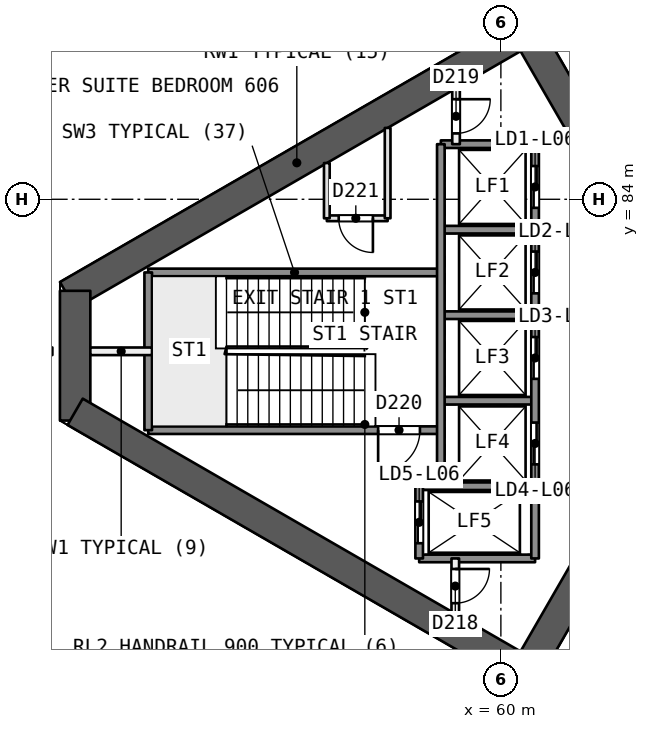
"""IFC4 building model, lengths in metres.
Left out: names, types, materials, properties, quantities, classifications, styles, units other than length and angle.
Written with IfcOpenShell. Run it as: python <this file> out.ifc"""

import sys

from ifc_helpers import new_model, si_unit, direction, frame, frame_2d, origin, place, context, subcontext, project, spatial, rectangle, extrude, element, fill, save


model = new_model("IFC4")
c1 = context("Model", 3, precision=1e-05, world=origin(), true_north=direction((0.0, 1.0)))
c2 = subcontext(c1, "Body", "Model", "MODEL_VIEW")
j1 = project(units=[si_unit("LENGTHUNIT", "METRE"), si_unit("PLANEANGLEUNIT", "RADIAN")], contexts=[c1])
p1 = place(None, origin())
s1 = spatial("IfcSite", under=j1, at=p1, CompositionType="ELEMENT")
p2 = place(p1, origin())
s2 = spatial("IfcBuilding", under=s1, at=p2, CompositionType="ELEMENT")
p3 = place(p2, frame((0.0, 0.0, 33.7)))
s3 = spatial("IfcBuildingStorey", under=s2, at=p3, CompositionType="ELEMENT", Elevation=33.7)
p4 = place(p3, frame((65.538, 80.0, 0.0), z_axis=(0.0, 0.0, 1.0), x_axis=(-0.49999662545, 0.866027352073, 0.0)))
e1 = element("IfcWall", 1, at=p4, inside=s3, PredefinedType="SHEAR", context=c2, shape_type="SweptSolid", body=[
    extrude(rectangle(XDim=10.149, YDim=0.8, at=frame_2d((5.074, 0.0))), origin(), (0.0, 0.0, 1.0), 3.7),
])
p5 = place(p4, frame((0.719, 0.0, 0.0)))
e2 = element("IfcOpeningElement", 2, at=p5, cuts=e1, PredefinedType="OPENING", context=c2, shape_type="SweptSolid", body=[
    extrude(rectangle(XDim=1.2, YDim=2.1, at=frame_2d((0.6, 1.05))), frame((0.0, 0.411, 0.0), z_axis=(0.0, -1.0, 0.0), x_axis=(1.0, 0.0, 0.0)), (0.0, 0.0, 1.0), 0.821),
])
p6 = place(p3, frame((60.664, 88.443, 0.0), z_axis=(0.0, 0.0, 1.0), x_axis=(-0.866029478545, -0.499992942241, 0.0)))
e3 = element("IfcWall", 3, at=p6, inside=s3, PredefinedType="SHEAR", context=c2, shape_type="SweptSolid", body=[
    extrude(rectangle(XDim=13.933, YDim=0.8, at=frame_2d((6.967, 0.0))), origin(), (0.0, 0.0, 1.0), 3.7),
])
p7 = place(p3, frame((48.797, 81.592, 0.0), z_axis=(0.0, 0.0, 1.0), x_axis=(0.0, -1.0, 0.0)))
e4 = element("IfcWall", 4, at=p7, inside=s3, PredefinedType="SHEAR", context=c2, shape_type="SweptSolid", body=[
    extrude(rectangle(XDim=3.415, YDim=0.8, at=frame_2d((1.707, 0.0))), origin(), (0.0, 0.0, 1.0), 3.7),
])
p8 = place(p3, frame((48.797, 78.408, 0.0), z_axis=(0.0, 0.0, 1.0), x_axis=(0.866032504327, -0.499987701298, 0.0)))
e5 = element("IfcWall", 5, at=p8, inside=s3, PredefinedType="SHEAR", context=c2, shape_type="SweptSolid", body=[
    extrude(rectangle(XDim=14.102, YDim=0.8, at=frame_2d((7.051, 0.0))), origin(), (0.0, 0.0, 1.0), 3.7),
])
p9 = place(p3, frame((60.664, 71.557, 0.0), z_axis=(0.0, 0.0, 1.0), x_axis=(0.50000409368, 0.866023040284, 0.0)))
e6 = element("IfcWall", 6, at=p9, inside=s3, PredefinedType="SHEAR", context=c2, shape_type="SweptSolid", body=[
    extrude(rectangle(XDim=9.98, YDim=0.8, at=frame_2d((4.99, 0.0))), origin(), (0.0, 0.0, 1.0), 3.7),
])
p10 = place(p9, frame((7.83, 0.0, 0.0)))
e7 = element("IfcOpeningElement", 7, at=p10, cuts=e6, PredefinedType="OPENING", context=c2, shape_type="SweptSolid", body=[
    extrude(rectangle(XDim=1.2, YDim=2.1, at=frame_2d((0.6, 1.05))), frame((0.0, 0.411, 0.0), z_axis=(0.0, -1.0, 0.0), x_axis=(1.0, 0.0, 0.0)), (0.0, 0.0, 1.0), 0.821),
])
p11 = place(p3, frame((37.759, 80.001, 0.0), z_axis=(0.0, 0.0, 1.0), x_axis=(1.0, 0.0, 0.0)))
e8 = element("IfcWall", 8, at=p11, inside=s3, PredefinedType="PARTITIONING", context=c2, shape_type="SweptSolid", body=[
    extrude(rectangle(XDim=10.439, YDim=0.2, at=frame_2d((5.22, 0.0))), origin(), (0.0, 0.0, 1.0), 3.2),
])
p12 = place(p3, frame((61.662, 63.133, 0.0), z_axis=(0.0, 0.0, 1.0), x_axis=(0.499999157533, 0.866025890183, 0.0)))
e9 = element("IfcWall", 9, at=p12, inside=s3, PredefinedType="PARTITIONING", context=c2, shape_type="SweptSolid", body=[
    extrude(rectangle(XDim=11.176, YDim=0.2, at=frame_2d((5.588, 0.0))), origin(), (0.0, 0.0, 1.0), 3.2),
])
p13 = place(p3, frame((37.61, 83.152, 0.0), z_axis=(0.0, 0.0, 1.0), x_axis=(0.866024438126, 0.500001672566, 0.0)))
e10 = element("IfcWall", 10, at=p13, inside=s3, PredefinedType="SOLIDWALL", context=c2, shape_type="SweptSolid", body=[
    extrude(rectangle(XDim=61.61, YDim=0.3, at=frame_2d((30.805, 0.0))), origin(), (0.0, 0.0, 1.0), 3.2),
])
p14 = place(p13, frame((34.281, 0.0, 0.0)))
e11 = element("IfcOpeningElement", 11, at=p14, cuts=e10, PredefinedType="OPENING", context=c2, shape_type="SweptSolid", body=[
    extrude(rectangle(XDim=2.4, YDim=2.4, at=frame_2d((1.2, 1.2))), frame((0.0, 0.161, 0.0), z_axis=(0.0, -1.0, 0.0), x_axis=(1.0, 0.0, 0.0)), (0.0, 0.0, 1.0), 0.321),
])
p15 = place(p13, frame((47.767, 0.0, 0.0)))
e12 = element("IfcOpeningElement", 12, at=p15, cuts=e10, PredefinedType="OPENING", context=c2, shape_type="SweptSolid", body=[
    extrude(rectangle(XDim=2.4, YDim=2.4, at=frame_2d((1.2, 1.2))), frame((0.0, 0.161, 0.0), z_axis=(0.0, -1.0, 0.0), x_axis=(1.0, 0.0, 0.0)), (0.0, 0.0, 1.0), 0.321),
])
p16 = place(p13, frame((24.305, 0.0, 0.0)))
e13 = element("IfcOpeningElement", 13, at=p16, cuts=e10, PredefinedType="OPENING", context=c2, shape_type="SweptSolid", body=[
    extrude(rectangle(XDim=2.4, YDim=2.4, at=frame_2d((1.2, 1.2))), frame((0.0, 0.161, 0.0), z_axis=(0.0, -1.0, 0.0), x_axis=(1.0, 0.0, 0.0)), (0.0, 0.0, 1.0), 0.321),
])
p17 = place(p13, frame((11.402, 0.0, 0.0)))
e14 = element("IfcOpeningElement", 14, at=p17, cuts=e10, PredefinedType="OPENING", context=c2, shape_type="SweptSolid", body=[
    extrude(rectangle(XDim=2.4, YDim=2.4, at=frame_2d((1.2, 1.2))), frame((0.0, 0.161, 0.0), z_axis=(0.0, -1.0, 0.0), x_axis=(1.0, 0.0, 0.0)), (0.0, 0.0, 1.0), 0.321),
])
p18 = place(p13, frame((28.981, 0.0, 0.0)))
e15 = element("IfcOpeningElement", 15, at=p18, cuts=e10, PredefinedType="OPENING", context=c2, shape_type="SweptSolid", body=[
    extrude(rectangle(XDim=2.4, YDim=2.4, at=frame_2d((1.2, 1.2))), frame((0.0, 0.161, 0.0), z_axis=(0.0, -1.0, 0.0), x_axis=(1.0, 0.0, 0.0)), (0.0, 0.0, 1.0), 0.321),
])
p19 = place(p3, frame((90.965, 46.043, 0.0), z_axis=(0.0, 0.0, 1.0), x_axis=(-0.866024438126, 0.500001672566, 0.0)))
e16 = element("IfcWall", 16, at=p19, inside=s3, PredefinedType="SOLIDWALL", context=c2, shape_type="SweptSolid", body=[
    extrude(rectangle(XDim=61.61, YDim=0.3, at=frame_2d((30.805, 0.0))), origin(), (0.0, 0.0, 1.0), 3.2),
])
p20 = place(p19, frame((29.293, 0.0, 0.0)))
e17 = element("IfcOpeningElement", 17, at=p20, cuts=e16, PredefinedType="OPENING", context=c2, shape_type="SweptSolid", body=[
    extrude(rectangle(XDim=2.4, YDim=2.4, at=frame_2d((1.2, 1.2))), frame((0.0, 0.161, 0.0), z_axis=(0.0, -1.0, 0.0), x_axis=(1.0, 0.0, 0.0)), (0.0, 0.0, 1.0), 0.321),
])
p21 = place(p19, frame((46.61, 0.0, 0.0)))
e18 = element("IfcOpeningElement", 18, at=p21, cuts=e16, PredefinedType="OPENING", context=c2, shape_type="SweptSolid", body=[
    extrude(rectangle(XDim=2.4, YDim=2.4, at=frame_2d((1.2, 1.2))), frame((0.0, 0.161, 0.0), z_axis=(0.0, -1.0, 0.0), x_axis=(1.0, 0.0, 0.0)), (0.0, 0.0, 1.0), 0.321),
])
p22 = place(p19, frame((12.289, 0.0, 0.0)))
e19 = element("IfcOpeningElement", 19, at=p22, cuts=e16, PredefinedType="OPENING", context=c2, shape_type="SweptSolid", body=[
    extrude(rectangle(XDim=2.4, YDim=2.4, at=frame_2d((1.2, 1.2))), frame((0.0, 0.161, 0.0), z_axis=(0.0, -1.0, 0.0), x_axis=(1.0, 0.0, 0.0)), (0.0, 0.0, 1.0), 0.321),
])
p23 = place(p3, frame((60.9, 85.45, 0.0), z_axis=(0.0, 0.0, 1.0), x_axis=(-1.0, 0.0, 0.0)))
e20 = element("IfcWall", 20, at=p23, inside=s3, PredefinedType="SOLIDWALL", context=c2, shape_type="SweptSolid", body=[
    extrude(rectangle(XDim=2.48, YDim=0.2, at=frame_2d((1.24, 0.0))), origin(), (0.0, 0.0, 1.0), 3.2),
])
p24 = place(p3, frame((57.02, 83.5, 0.0), z_axis=(0.0, 0.0, 1.0), x_axis=(-1.0, 0.0, 0.0)))
e21 = element("IfcWall", 21, at=p24, inside=s3, PredefinedType="PARTITIONING", context=c2, shape_type="SweptSolid", body=[
    extrude(rectangle(XDim=1.6, YDim=0.15, at=frame_2d((0.8, 0.0))), origin(), (0.0, 0.0, 1.0), 3.2),
])
p25 = place(p24, frame((0.387, 0.0, 0.0)))
e22 = element("IfcOpeningElement", 22, at=p25, cuts=e21, PredefinedType="OPENING", context=c2, shape_type="SweptSolid", body=[
    extrude(rectangle(XDim=0.9, YDim=2.1, at=frame_2d((0.45, 1.05))), frame((0.0, 0.085, 0.0), z_axis=(0.0, -1.0, 0.0), x_axis=(1.0, 0.0, 0.0)), (0.0, 0.0, 1.0), 0.171),
])
p26 = place(p3, frame((60.9, 83.2, 0.0), z_axis=(0.0, 0.0, 1.0), x_axis=(-1.0, 0.0, 0.0)))
e23 = element("IfcWall", 23, at=p26, inside=s3, PredefinedType="SOLIDWALL", context=c2, shape_type="SweptSolid", body=[
    extrude(rectangle(XDim=2.48, YDim=0.2, at=frame_2d((1.24, 0.0))), origin(), (0.0, 0.0, 1.0), 3.2),
])
p27 = place(p3, frame((58.42, 82.075, 0.0), z_axis=(0.0, 0.0, 1.0), x_axis=(-1.0, 0.0, 0.0)))
e24 = element("IfcWall", 24, at=p27, inside=s3, PredefinedType="SOLIDWALL", context=c2, shape_type="SweptSolid", body=[
    extrude(rectangle(XDim=7.7, YDim=0.2, at=frame_2d((3.85, 0.0))), origin(), (0.0, 0.0, 1.0), 3.2),
])
p28 = place(p3, frame((60.9, 80.95, 0.0), z_axis=(0.0, 0.0, 1.0), x_axis=(-1.0, 0.0, 0.0)))
e25 = element("IfcWall", 25, at=p28, inside=s3, PredefinedType="SOLIDWALL", context=c2, shape_type="SweptSolid", body=[
    extrude(rectangle(XDim=2.48, YDim=0.2, at=frame_2d((1.24, 0.0))), origin(), (0.0, 0.0, 1.0), 3.2),
])
p29 = place(p3, frame((50.82, 80.0, 0.0), z_axis=(0.0, 0.0, 1.0), x_axis=(-1.0, 0.0, 0.0)))
e26 = element("IfcWall", 26, at=p29, inside=s3, PredefinedType="PARTITIONING", context=c2, shape_type="SweptSolid", body=[
    extrude(rectangle(XDim=1.623, YDim=0.2, at=frame_2d((0.812, 0.0))), origin(), (0.0, 0.0, 1.0), 3.2),
])
p30 = place(p3, frame((60.9, 78.7, 0.0), z_axis=(0.0, 0.0, 1.0), x_axis=(-1.0, 0.0, 0.0)))
e27 = element("IfcWall", 27, at=p30, inside=s3, PredefinedType="SOLIDWALL", context=c2, shape_type="SweptSolid", body=[
    extrude(rectangle(XDim=2.48, YDim=0.2, at=frame_2d((1.24, 0.0))), origin(), (0.0, 0.0, 1.0), 3.2),
])
p31 = place(p3, frame((58.42, 77.925, 0.0), z_axis=(0.0, 0.0, 1.0), x_axis=(-1.0, 0.0, 0.0)))
e28 = element("IfcWall", 28, at=p31, inside=s3, PredefinedType="SOLIDWALL", context=c2, shape_type="SweptSolid", body=[
    extrude(rectangle(XDim=7.7, YDim=0.2, at=frame_2d((3.85, 0.0))), origin(), (0.0, 0.0, 1.0), 3.2),
])
p32 = place(p31, frame((0.55, 0.0, 0.0)))
e29 = element("IfcOpeningElement", 29, at=p32, cuts=e28, PredefinedType="OPENING", context=c2, shape_type="SweptSolid", body=[
    extrude(rectangle(XDim=1.1, YDim=2.1, at=frame_2d((0.55, 1.05))), frame((0.0, 0.11, 0.0), z_axis=(0.0, -1.0, 0.0), x_axis=(1.0, 0.0, 0.0)), (0.0, 0.0, 1.0), 0.221),
])
for number, where, z_axis, x_axis in (
    (30, (60.9, 76.45, 0.0), (0.0, 0.0, 1.0), (-1.0, 0.0, 0.0)),
    (31, (60.9, 74.55, 0.0), (0.0, 0.0, 1.0), (-1.0, 0.0, 0.0)),
):
    element("IfcWall", number, at=place(p3, frame(where, z_axis=z_axis, x_axis=x_axis)), inside=s3, PredefinedType="SOLIDWALL", context=c2, shape_type="SweptSolid", body=[
        extrude(rectangle(XDim=3.05, YDim=0.2, at=frame_2d((1.525, 0.0))), origin(), (0.0, 0.0, 1.0), 3.2),
    ])
p33 = place(p3, frame((60.9, 85.45, 0.0), z_axis=(0.0, 0.0, 1.0), x_axis=(0.0, -1.0, 0.0)))
e32 = element("IfcWall", 32, at=p33, inside=s3, PredefinedType="SOLIDWALL", context=c2, shape_type="SweptSolid", body=[
    extrude(rectangle(XDim=10.9, YDim=0.2, at=frame_2d((5.45, 0.0))), origin(), (0.0, 0.0, 1.0), 3.2),
])
p34 = place(p33, frame((0.575, 0.0, 0.0)))
e33 = element("IfcOpeningElement", 33, at=p34, cuts=e32, PredefinedType="OPENING", context=c2, shape_type="SweptSolid", body=[
    extrude(rectangle(XDim=1.1, YDim=2.1, at=frame_2d((0.55, 1.05))), frame((0.0, 0.11, 0.0), z_axis=(0.0, -1.0, 0.0), x_axis=(1.0, 0.0, 0.0)), (0.0, 0.0, 1.0), 0.221),
])
p35 = place(p33, frame((2.825, 0.0, 0.0)))
e34 = element("IfcOpeningElement", 34, at=p35, cuts=e32, PredefinedType="OPENING", context=c2, shape_type="SweptSolid", body=[
    extrude(rectangle(XDim=1.1, YDim=2.1, at=frame_2d((0.55, 1.05))), frame((0.0, 0.11, 0.0), z_axis=(0.0, -1.0, 0.0), x_axis=(1.0, 0.0, 0.0)), (0.0, 0.0, 1.0), 0.221),
])
p36 = place(p33, frame((5.075, 0.0, 0.0)))
e35 = element("IfcOpeningElement", 35, at=p36, cuts=e32, PredefinedType="OPENING", context=c2, shape_type="SweptSolid", body=[
    extrude(rectangle(XDim=1.1, YDim=2.1, at=frame_2d((0.55, 1.05))), frame((0.0, 0.11, 0.0), z_axis=(0.0, -1.0, 0.0), x_axis=(1.0, 0.0, 0.0)), (0.0, 0.0, 1.0), 0.221),
])
p37 = place(p33, frame((7.325, 0.0, 0.0)))
e36 = element("IfcOpeningElement", 36, at=p37, cuts=e32, PredefinedType="OPENING", context=c2, shape_type="SweptSolid", body=[
    extrude(rectangle(XDim=1.1, YDim=2.1, at=frame_2d((0.55, 1.05))), frame((0.0, 0.11, 0.0), z_axis=(0.0, -1.0, 0.0), x_axis=(1.0, 0.0, 0.0)), (0.0, 0.0, 1.0), 0.221),
])
p38 = place(p3, frame((58.82, 86.917, 0.0), z_axis=(0.0, 0.0, 1.0), x_axis=(0.0, -1.0, 0.0)))
e37 = element("IfcWall", 37, at=p38, inside=s3, PredefinedType="PARTITIONING", context=c2, shape_type="SweptSolid", body=[
    extrude(rectangle(XDim=1.467, YDim=0.2, at=frame_2d((0.733, 0.0))), origin(), (0.0, 0.0, 1.0), 3.2),
])
p39 = place(p38, frame((0.283, 0.0, 0.0)))
e38 = element("IfcOpeningElement", 38, at=p39, cuts=e37, PredefinedType="OPENING", context=c2, shape_type="SweptSolid", body=[
    extrude(rectangle(XDim=0.9, YDim=2.1, at=frame_2d((0.45, 1.05))), frame((0.0, 0.11, 0.0), z_axis=(0.0, -1.0, 0.0), x_axis=(1.0, 0.0, 0.0)), (0.0, 0.0, 1.0), 0.221),
])
p40 = place(p3, frame((58.8, 74.55, 0.0), z_axis=(0.0, 0.0, 1.0), x_axis=(0.0, -1.0, 0.0)))
e39 = element("IfcWall", 39, at=p40, inside=s3, PredefinedType="PARTITIONING", context=c2, shape_type="SweptSolid", body=[
    extrude(rectangle(XDim=1.455, YDim=0.2, at=frame_2d((0.728, 0.0))), origin(), (0.0, 0.0, 1.0), 3.2),
])
p41 = place(p40, frame((0.278, 0.0, 0.0)))
e40 = element("IfcOpeningElement", 40, at=p41, cuts=e39, PredefinedType="OPENING", context=c2, shape_type="SweptSolid", body=[
    extrude(rectangle(XDim=0.9, YDim=2.1, at=frame_2d((0.45, 1.05))), frame((0.0, 0.11, 0.0), z_axis=(0.0, -1.0, 0.0), x_axis=(1.0, 0.0, 0.0)), (0.0, 0.0, 1.0), 0.221),
])
p42 = place(p3, frame((58.42, 85.45, 0.0), z_axis=(0.0, 0.0, 1.0), x_axis=(0.0, -1.0, 0.0)))
e41 = element("IfcWall", 41, at=p42, inside=s3, PredefinedType="SOLIDWALL", context=c2, shape_type="SweptSolid", body=[
    extrude(rectangle(XDim=9.0, YDim=0.2, at=frame_2d((4.5, 0.0))), origin(), (0.0, 0.0, 1.0), 3.2),
])
p43 = place(p3, frame((57.85, 76.45, 0.0), z_axis=(0.0, 0.0, 1.0), x_axis=(0.0, -1.0, 0.0)))
e42 = element("IfcWall", 42, at=p43, inside=s3, PredefinedType="SOLIDWALL", context=c2, shape_type="SweptSolid", body=[
    extrude(rectangle(XDim=1.9, YDim=0.2, at=frame_2d((0.95, 0.0))), origin(), (0.0, 0.0, 1.0), 3.2),
])
p44 = place(p43, frame((0.4, 0.0, 0.0)))
e43 = element("IfcOpeningElement", 43, at=p44, cuts=e42, PredefinedType="OPENING", context=c2, shape_type="SweptSolid", body=[
    extrude(rectangle(XDim=1.1, YDim=2.1, at=frame_2d((0.55, 1.05))), frame((0.0, 0.11, 0.0), z_axis=(0.0, -1.0, 0.0), x_axis=(1.0, 0.0, 0.0)), (0.0, 0.0, 1.0), 0.221),
])
p45 = place(p3, frame((57.02, 85.877, 0.0), z_axis=(0.0, 0.0, 1.0), x_axis=(0.0, -1.0, 0.0)))
e44 = element("IfcWall", 44, at=p45, inside=s3, PredefinedType="PARTITIONING", context=c2, shape_type="SweptSolid", body=[
    extrude(rectangle(XDim=2.377, YDim=0.15, at=frame_2d((1.189, 0.0))), origin(), (0.0, 0.0, 1.0), 3.2),
])
p46 = place(p3, frame((55.42, 84.954, 0.0), z_axis=(0.0, 0.0, 1.0), x_axis=(0.0, -1.0, 0.0)))
e45 = element("IfcWall", 45, at=p46, inside=s3, PredefinedType="PARTITIONING", context=c2, shape_type="SweptSolid", body=[
    extrude(rectangle(XDim=1.454, YDim=0.15, at=frame_2d((0.727, 0.0))), origin(), (0.0, 0.0, 1.0), 3.2),
])
p47 = place(p3, frame((50.72, 82.075, 0.0), z_axis=(0.0, 0.0, 1.0), x_axis=(0.0, -1.0, 0.0)))
e46 = element("IfcWall", 46, at=p47, inside=s3, PredefinedType="SOLIDWALL", context=c2, shape_type="SweptSolid", body=[
    extrude(rectangle(XDim=4.15, YDim=0.2, at=frame_2d((2.075, 0.0))), origin(), (0.0, 0.0, 1.0), 3.2),
])
p48 = place(p34, origin())
e47 = element("IfcDoor", 47, at=p48, inside=s3, OperationType="SLIDING_TO_RIGHT", PredefinedType="NOTDEFINED", context=c2, shape_type="SweptSolid", body=[
    extrude(rectangle(XDim=1.1, YDim=2.1, at=frame_2d((0.55, 1.05))), frame((0.0, 0.025, 0.0), z_axis=(0.0, -1.0, 0.0), x_axis=(1.0, 0.0, 0.0)), (0.0, 0.0, 1.0), 0.05),
])
fill(e33, e47)
p49 = place(p35, origin())
e48 = element("IfcDoor", 48, at=p49, inside=s3, OperationType="SLIDING_TO_LEFT", PredefinedType="NOTDEFINED", context=c2, shape_type="SweptSolid", body=[
    extrude(rectangle(XDim=1.1, YDim=2.1, at=frame_2d((0.55, 1.05))), frame((0.0, 0.025, 0.0), z_axis=(0.0, -1.0, 0.0), x_axis=(1.0, 0.0, 0.0)), (0.0, 0.0, 1.0), 0.05),
])
fill(e34, e48)
p50 = place(p36, origin())
e49 = element("IfcDoor", 49, at=p50, inside=s3, OperationType="SLIDING_TO_RIGHT", PredefinedType="NOTDEFINED", context=c2, shape_type="SweptSolid", body=[
    extrude(rectangle(XDim=1.1, YDim=2.1, at=frame_2d((0.55, 1.05))), frame((0.0, 0.025, 0.0), z_axis=(0.0, -1.0, 0.0), x_axis=(1.0, 0.0, 0.0)), (0.0, 0.0, 1.0), 0.05),
])
fill(e35, e49)
p51 = place(p37, origin())
e50 = element("IfcDoor", 50, at=p51, inside=s3, OperationType="SLIDING_TO_LEFT", PredefinedType="NOTDEFINED", context=c2, shape_type="SweptSolid", body=[
    extrude(rectangle(XDim=1.1, YDim=2.1, at=frame_2d((0.55, 1.05))), frame((0.0, 0.025, 0.0), z_axis=(0.0, -1.0, 0.0), x_axis=(1.0, 0.0, 0.0)), (0.0, 0.0, 1.0), 0.05),
])
fill(e36, e50)
p52 = place(p44, origin())
e51 = element("IfcDoor", 51, at=p52, inside=s3, OperationType="SLIDING_TO_RIGHT", PredefinedType="NOTDEFINED", context=c2, shape_type="SweptSolid", body=[
    extrude(rectangle(XDim=1.1, YDim=2.1, at=frame_2d((0.55, 1.05))), frame((0.0, 0.025, 0.0), z_axis=(0.0, -1.0, 0.0), x_axis=(1.0, 0.0, 0.0)), (0.0, 0.0, 1.0), 0.05),
])
fill(e43, e51)
p53 = place(p41, origin())
e52 = element("IfcDoor", 52, at=p53, inside=s3, OperationType="SINGLE_SWING_LEFT", PredefinedType="NOTDEFINED", context=c2, shape_type="SweptSolid", body=[
    extrude(rectangle(XDim=0.9, YDim=2.1, at=frame_2d((0.45, 1.05))), frame((0.0, 0.025, 0.0), z_axis=(0.0, -1.0, 0.0), x_axis=(1.0, 0.0, 0.0)), (0.0, 0.0, 1.0), 0.05),
])
fill(e40, e52)
p54 = place(p39, origin())
e53 = element("IfcDoor", 53, at=p54, inside=s3, OperationType="SINGLE_SWING_LEFT", PredefinedType="NOTDEFINED", context=c2, shape_type="SweptSolid", body=[
    extrude(rectangle(XDim=0.9, YDim=2.1, at=frame_2d((0.45, 1.05))), frame((0.0, 0.025, 0.0), z_axis=(0.0, -1.0, 0.0), x_axis=(1.0, 0.0, 0.0)), (0.0, 0.0, 1.0), 0.05),
])
fill(e38, e53)
p55 = place(p32, origin())
e54 = element("IfcDoor", 54, at=p55, inside=s3, OperationType="SINGLE_SWING_RIGHT", PredefinedType="NOTDEFINED", context=c2, shape_type="SweptSolid", body=[
    extrude(rectangle(XDim=1.1, YDim=2.1, at=frame_2d((0.55, 1.05))), frame((0.0, 0.025, 0.0), z_axis=(0.0, -1.0, 0.0), x_axis=(1.0, 0.0, 0.0)), (0.0, 0.0, 1.0), 0.05),
])
fill(e29, e54)
p56 = place(p25, origin())
e55 = element("IfcDoor", 55, at=p56, inside=s3, OperationType="SINGLE_SWING_LEFT", PredefinedType="NOTDEFINED", context=c2, shape_type="SweptSolid", body=[
    extrude(rectangle(XDim=0.9, YDim=2.1, at=frame_2d((0.45, 1.05))), frame((0.0, 0.025, 0.0), z_axis=(0.0, -1.0, 0.0), x_axis=(1.0, 0.0, 0.0)), (0.0, 0.0, 1.0), 0.05),
])
fill(e22, e55)
save(model, sys.argv[1])
